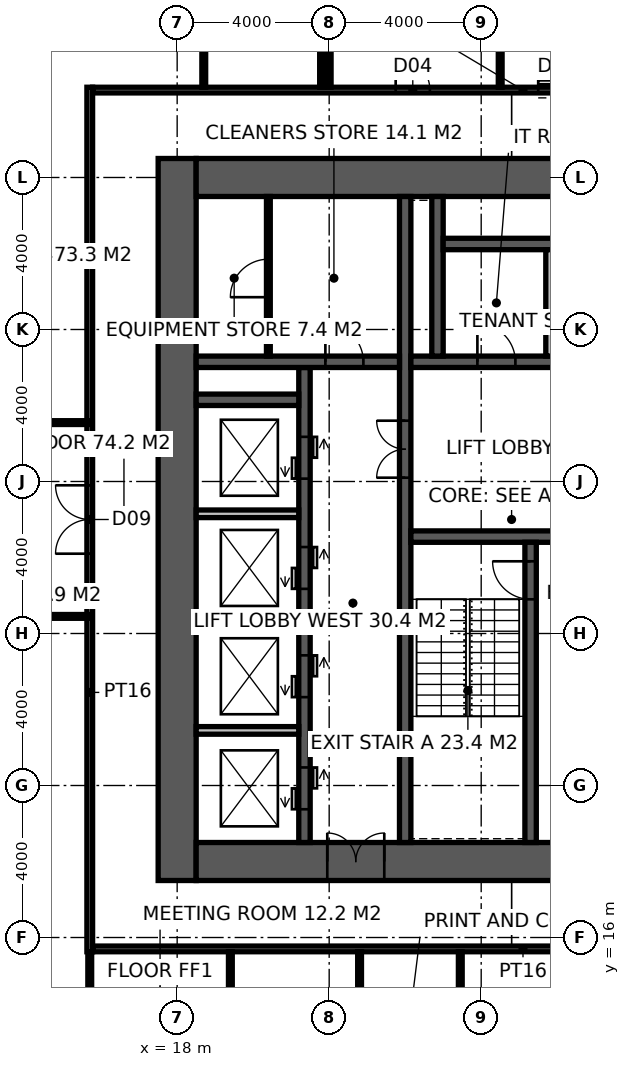
"""IFC4 building model, lengths in metres.
Left out: names, types, materials, properties, quantities, classifications, styles, units other than length and angle.
Written with IfcOpenShell. Run it as: python <this file> out.ifc"""

import sys

from ifc_helpers import new_model, si_unit, direction, frame, frame_2d, origin, place, context, subcontext, project, spatial, rectangle, extrude, element, fill, save


model = new_model("IFC4")
c1 = context("Model", 3, precision=1e-05, world=origin(), true_north=direction((0.0, 1.0)))
c2 = subcontext(c1, "Body", "Model", "MODEL_VIEW")
j1 = project(units=[si_unit("LENGTHUNIT", "METRE"), si_unit("PLANEANGLEUNIT", "RADIAN")], contexts=[c1])
p1 = place(None, origin())
s1 = spatial("IfcSite", under=j1, at=p1, CompositionType="ELEMENT")
p2 = place(p1, origin())
s2 = spatial("IfcBuilding", under=s1, at=p2, CompositionType="ELEMENT")
p3 = place(p2, frame((0.0, 0.0, 230.2)))
s3 = spatial("IfcBuildingStorey", under=s2, at=p3, CompositionType="ELEMENT", Elevation=230.2)
p4 = place(p3, frame((18.0, 17.5, -0.15), z_axis=(0.0, 0.0, 1.0), x_axis=(0.0, 1.0, 0.0)))
e1 = element("IfcWall", 1, at=p4, inside=s3, PredefinedType="SHEAR", context=c2, shape_type="SweptSolid", body=[
    extrude(rectangle(XDim=19.0, YDim=1.0, at=frame_2d((9.5, 0.0))), origin(), (0.0, 0.0, 1.0), 4.0),
])
p5 = place(p3, frame((18.5, 18.0, -0.15), z_axis=(0.0, 0.0, 1.0), x_axis=(1.0, 0.0, 0.0)))
e2 = element("IfcWall", 2, at=p5, inside=s3, PredefinedType="SHEAR", context=c2, shape_type="SweptSolid", body=[
    extrude(rectangle(XDim=17.6, YDim=1.0, at=frame_2d((8.8, 0.0))), origin(), (0.0, 0.0, 1.0), 4.0),
])
p6 = place(p5, frame((3.45, 0.0, 0.15)))
e3 = element("IfcOpeningElement", 3, at=p6, cuts=e2, PredefinedType="OPENING", context=c2, shape_type="SweptSolid", body=[
    extrude(rectangle(XDim=1.5, YDim=2.4, at=frame_2d((0.75, 1.2))), frame((0.0, 0.51, 0.0), z_axis=(0.0, -1.0, 0.0), x_axis=(1.0, 0.0, 0.0)), (0.0, 0.0, 1.0), 1.02),
])
p7 = place(p3, frame((18.5, 36.0, -0.15), z_axis=(0.0, 0.0, 1.0), x_axis=(1.0, 0.0, 0.0)))
e4 = element("IfcWall", 4, at=p7, inside=s3, PredefinedType="SHEAR", context=c2, shape_type="SweptSolid", body=[
    extrude(rectangle(XDim=17.6, YDim=1.0, at=frame_2d((8.8, 0.0))), origin(), (0.0, 0.0, 1.0), 4.0),
])
p8 = place(p3, frame((24.0, 18.5, -0.15), z_axis=(0.0, 0.0, 1.0), x_axis=(0.0, 1.0, 0.0)))
e5 = element("IfcWall", 5, at=p8, inside=s3, PredefinedType="SHEAR", context=c2, shape_type="SweptSolid", body=[
    extrude(rectangle(XDim=17.0, YDim=0.3, at=frame_2d((8.5, 0.0))), origin(), (0.0, 0.0, 1.0), 4.0),
])
p9 = place(p8, frame((9.6, 0.0, 0.15)))
e6 = element("IfcOpeningElement", 6, at=p9, cuts=e5, PredefinedType="OPENING", context=c2, shape_type="SweptSolid", body=[
    extrude(rectangle(XDim=1.5, YDim=2.4, at=frame_2d((0.75, 1.2))), frame((0.0, 0.16, 0.0), z_axis=(0.0, -1.0, 0.0), x_axis=(1.0, 0.0, 0.0)), (0.0, 0.0, 1.0), 0.32),
])
p10 = place(p3, frame((24.15, 26.55, -0.15), z_axis=(0.0, 0.0, 1.0), x_axis=(1.0, 0.0, 0.0)))
e7 = element("IfcWall", 7, at=p10, inside=s3, PredefinedType="SHEAR", context=c2, shape_type="SweptSolid", body=[
    extrude(rectangle(XDim=11.25, YDim=0.3, at=frame_2d((5.625, 0.0))), origin(), (0.0, 0.0, 1.0), 4.0),
])
p11 = place(p10, frame((9.25, 0.0, 0.15)))
e8 = element("IfcOpeningElement", 8, at=p11, cuts=e7, PredefinedType="OPENING", context=c2, shape_type="SweptSolid", body=[
    extrude(rectangle(XDim=1.0, YDim=2.2, at=frame_2d((0.5, 1.1))), frame((0.0, 0.16, 0.0), z_axis=(0.0, -1.0, 0.0), x_axis=(1.0, 0.0, 0.0)), (0.0, 0.0, 1.0), 0.32),
])
p12 = place(p10, frame((4.9, 0.0, 0.15)))
e9 = element("IfcOpeningElement", 9, at=p12, cuts=e7, PredefinedType="OPENING", context=c2, shape_type="SweptSolid", body=[
    extrude(rectangle(XDim=1.5, YDim=2.4, at=frame_2d((0.75, 1.2))), frame((0.0, 0.16, 0.0), z_axis=(0.0, -1.0, 0.0), x_axis=(1.0, 0.0, 0.0)), (0.0, 0.0, 1.0), 0.32),
])
p13 = place(p3, frame((27.3, 18.5, -0.15), z_axis=(0.0, 0.0, 1.0), x_axis=(0.0, 1.0, 0.0)))
e10 = element("IfcWall", 10, at=p13, inside=s3, PredefinedType="SHEAR", context=c2, shape_type="SweptSolid", body=[
    extrude(rectangle(XDim=7.9, YDim=0.3, at=frame_2d((3.95, 0.0))), origin(), (0.0, 0.0, 1.0), 4.0),
])
p14 = place(p13, frame((6.4, 0.0, 0.15)))
e11 = element("IfcOpeningElement", 11, at=p14, cuts=e10, PredefinedType="OPENING", context=c2, shape_type="SweptSolid", body=[
    extrude(rectangle(XDim=1.0, YDim=2.2, at=frame_2d((0.5, 1.1))), frame((0.0, 0.16, 0.0), z_axis=(0.0, -1.0, 0.0), x_axis=(1.0, 0.0, 0.0)), (0.0, 0.0, 1.0), 0.32),
])
p15 = place(p3, frame((24.15, 31.15, -0.15), z_axis=(0.0, 0.0, 1.0), x_axis=(1.0, 0.0, 0.0)))
e12 = element("IfcWall", 12, at=p15, inside=s3, PredefinedType="SHEAR", context=c2, shape_type="SweptSolid", body=[
    extrude(rectangle(XDim=11.25, YDim=0.3, at=frame_2d((5.625, 0.0))), origin(), (0.0, 0.0, 1.0), 4.0),
])
p16 = place(p15, frame((1.75, 0.0, 0.15)))
e13 = element("IfcOpeningElement", 13, at=p16, cuts=e12, PredefinedType="OPENING", context=c2, shape_type="SweptSolid", body=[
    extrude(rectangle(XDim=1.0, YDim=2.2, at=frame_2d((0.5, 1.1))), frame((0.0, 0.16, 0.0), z_axis=(0.0, -1.0, 0.0), x_axis=(1.0, 0.0, 0.0)), (0.0, 0.0, 1.0), 0.32),
])
p17 = place(p15, frame((4.55, 0.0, 0.15)))
e14 = element("IfcOpeningElement", 14, at=p17, cuts=e12, PredefinedType="OPENING", context=c2, shape_type="SweptSolid", body=[
    extrude(rectangle(XDim=1.0, YDim=2.2, at=frame_2d((0.5, 1.1))), frame((0.0, 0.16, 0.0), z_axis=(0.0, -1.0, 0.0), x_axis=(1.0, 0.0, 0.0)), (0.0, 0.0, 1.0), 0.32),
])
p18 = place(p15, frame((7.25, 0.0, 0.15)))
e15 = element("IfcOpeningElement", 15, at=p18, cuts=e12, PredefinedType="OPENING", context=c2, shape_type="SweptSolid", body=[
    extrude(rectangle(XDim=1.4, YDim=2.4, at=frame_2d((0.7, 1.2))), frame((0.0, 0.16, 0.0), z_axis=(0.0, -1.0, 0.0), x_axis=(1.0, 0.0, 0.0)), (0.0, 0.0, 1.0), 0.32),
])
p19 = place(p3, frame((21.35, 18.5, -0.15), z_axis=(0.0, 0.0, 1.0), x_axis=(0.0, 1.0, 0.0)))
e16 = element("IfcWall", 16, at=p19, inside=s3, PredefinedType="SHEAR", context=c2, shape_type="SweptSolid", body=[
    extrude(rectangle(XDim=12.5, YDim=0.3, at=frame_2d((6.25, 0.0))), origin(), (0.0, 0.0, 1.0), 4.0),
])
p20 = place(p19, frame((0.875, 0.0, 0.15)))
e17 = element("IfcOpeningElement", 17, at=p20, cuts=e16, PredefinedType="OPENING", context=c2, shape_type="SweptSolid", body=[
    extrude(rectangle(XDim=1.1, YDim=2.2, at=frame_2d((0.55, 1.1))), frame((0.0, 0.16, 0.0), z_axis=(0.0, -1.0, 0.0), x_axis=(1.0, 0.0, 0.0)), (0.0, 0.0, 1.0), 0.32),
])
p21 = place(p19, frame((3.825, 0.0, 0.15)))
e18 = element("IfcOpeningElement", 18, at=p21, cuts=e16, PredefinedType="OPENING", context=c2, shape_type="SweptSolid", body=[
    extrude(rectangle(XDim=1.1, YDim=2.2, at=frame_2d((0.55, 1.1))), frame((0.0, 0.16, 0.0), z_axis=(0.0, -1.0, 0.0), x_axis=(1.0, 0.0, 0.0)), (0.0, 0.0, 1.0), 0.32),
])
p22 = place(p19, frame((6.675, 0.0, 0.15)))
e19 = element("IfcOpeningElement", 19, at=p22, cuts=e16, PredefinedType="OPENING", context=c2, shape_type="SweptSolid", body=[
    extrude(rectangle(XDim=1.1, YDim=2.2, at=frame_2d((0.55, 1.1))), frame((0.0, 0.16, 0.0), z_axis=(0.0, -1.0, 0.0), x_axis=(1.0, 0.0, 0.0)), (0.0, 0.0, 1.0), 0.32),
])
p23 = place(p19, frame((9.575, 0.0, 0.15)))
e20 = element("IfcOpeningElement", 20, at=p23, cuts=e16, PredefinedType="OPENING", context=c2, shape_type="SweptSolid", body=[
    extrude(rectangle(XDim=1.1, YDim=2.2, at=frame_2d((0.55, 1.1))), frame((0.0, 0.16, 0.0), z_axis=(0.0, -1.0, 0.0), x_axis=(1.0, 0.0, 0.0)), (0.0, 0.0, 1.0), 0.32),
])
p24 = place(p3, frame((18.5, 31.15, -0.15), z_axis=(0.0, 0.0, 1.0), x_axis=(1.0, 0.0, 0.0)))
e21 = element("IfcWall", 21, at=p24, inside=s3, PredefinedType="SHEAR", context=c2, shape_type="SweptSolid", body=[
    extrude(rectangle(XDim=5.35, YDim=0.3, at=frame_2d((2.675, 0.0))), origin(), (0.0, 0.0, 1.0), 4.0),
])
p25 = place(p24, frame((3.4, 0.0, 0.15)))
e22 = element("IfcOpeningElement", 22, at=p25, cuts=e21, PredefinedType="OPENING", context=c2, shape_type="SweptSolid", body=[
    extrude(rectangle(XDim=1.0, YDim=2.2, at=frame_2d((0.5, 1.1))), frame((0.0, 0.16, 0.0), z_axis=(0.0, -1.0, 0.0), x_axis=(1.0, 0.0, 0.0)), (0.0, 0.0, 1.0), 0.32),
])
p26 = place(p3, frame((18.5, 30.15, -0.15), z_axis=(0.0, 0.0, 1.0), x_axis=(1.0, 0.0, 0.0)))
e23 = element("IfcWall", 23, at=p26, inside=s3, PredefinedType="SHEAR", context=c2, shape_type="SweptSolid", body=[
    extrude(rectangle(XDim=2.7, YDim=0.3, at=frame_2d((1.35, 0.0))), origin(), (0.0, 0.0, 1.0), 4.0),
])
p27 = place(p3, frame((24.85, 31.3, -0.15), z_axis=(0.0, 0.0, 1.0), x_axis=(0.0, 1.0, 0.0)))
e24 = element("IfcWall", 24, at=p27, inside=s3, PredefinedType="SHEAR", context=c2, shape_type="SweptSolid", body=[
    extrude(rectangle(XDim=4.2, YDim=0.3, at=frame_2d((2.1, 0.0))), origin(), (0.0, 0.0, 1.0), 4.0),
])
p28 = place(p3, frame((25.0, 34.25, -0.15), z_axis=(0.0, 0.0, 1.0), x_axis=(1.0, 0.0, 0.0)))
e25 = element("IfcWall", 25, at=p28, inside=s3, PredefinedType="SHEAR", context=c2, shape_type="SweptSolid", body=[
    extrude(rectangle(XDim=8.6, YDim=0.3, at=frame_2d((4.3, 0.0))), origin(), (0.0, 0.0, 1.0), 4.0),
])
p29 = place(p3, frame((27.8, 31.3, -0.15), z_axis=(0.0, 0.0, 1.0), x_axis=(0.0, 1.0, 0.0)))
e26 = element("IfcWall", 26, at=p29, inside=s3, PredefinedType="SOLIDWALL", context=c2, shape_type="SweptSolid", body=[
    extrude(rectangle(XDim=2.8, YDim=0.2, at=frame_2d((1.4, 0.0))), origin(), (0.0, 0.0, 1.0), 4.0),
])
for number, where, z_axis, x_axis in (
    (27, (18.5, 21.45, -0.15), (0.0, 0.0, 1.0), (1.0, 0.0, 0.0)),
    (28, (18.5, 24.3, -0.15), (0.0, 0.0, 1.0), (1.0, 0.0, 0.0)),
    (29, (18.5, 27.15, -0.15), (0.0, 0.0, 1.0), (1.0, 0.0, 0.0)),
):
    element("IfcWall", number, at=place(p3, frame(where, z_axis=z_axis, x_axis=x_axis)), inside=s3, PredefinedType="SOLIDWALL", context=c2, shape_type="SweptSolid", body=[
        extrude(rectangle(XDim=2.7, YDim=0.2, at=frame_2d((1.35, 0.0))), origin(), (0.0, 0.0, 1.0), 4.0),
    ])
p30 = place(p3, frame((20.4, 31.3, 0.0), z_axis=(0.0, 0.0, 1.0), x_axis=(0.0, 1.0, 0.0)))
e30 = element("IfcWall", 30, at=p30, inside=s3, PredefinedType="PARTITIONING", context=c2, shape_type="SweptSolid", body=[
    extrude(rectangle(XDim=4.2, YDim=0.1, at=frame_2d((2.1, 0.0))), origin(), (0.0, 0.0, 1.0), 3.85),
])
p31 = place(p30, frame((1.55, 0.0, 0.0)))
e31 = element("IfcOpeningElement", 31, at=p31, cuts=e30, PredefinedType="OPENING", context=c2, shape_type="SweptSolid", body=[
    extrude(rectangle(XDim=1.0, YDim=2.2, at=frame_2d((0.5, 1.1))), frame((0.0, 0.06, 0.0), z_axis=(0.0, -1.0, 0.0), x_axis=(1.0, 0.0, 0.0)), (0.0, 0.0, 1.0), 0.12),
])
p32 = place(p3, frame((15.7, 15.625, 0.0), z_axis=(0.0, 0.0, 1.0), x_axis=(0.0, 1.0, 0.0)))
e32 = element("IfcWall", 32, at=p32, inside=s3, PredefinedType="PARTITIONING", context=c2, shape_type="SweptSolid", body=[
    extrude(rectangle(XDim=22.75, YDim=0.15, at=frame_2d((11.375, 0.0))), origin(), (0.0, 0.0, 1.0), 3.85),
])
p33 = place(p32, frame((10.475, 0.0, 0.0)))
e33 = element("IfcOpeningElement", 33, at=p33, cuts=e32, PredefinedType="OPENING", context=c2, shape_type="SweptSolid", body=[
    extrude(rectangle(XDim=1.8, YDim=2.4, at=frame_2d((0.9, 1.2))), frame((0.0, 0.085, 0.0), z_axis=(0.0, -1.0, 0.0), x_axis=(1.0, 0.0, 0.0)), (0.0, 0.0, 1.0), 0.17),
])
p34 = place(p3, frame((15.775, 15.7, 0.0), z_axis=(0.0, 0.0, 1.0), x_axis=(1.0, 0.0, 0.0)))
e34 = element("IfcWall", 34, at=p34, inside=s3, PredefinedType="PARTITIONING", context=c2, shape_type="SweptSolid", body=[
    extrude(rectangle(XDim=22.65, YDim=0.15, at=frame_2d((11.325, 0.0))), origin(), (0.0, 0.0, 1.0), 3.85),
])
p35 = place(p3, frame((15.775, 38.3, 0.0), z_axis=(0.0, 0.0, 1.0), x_axis=(1.0, 0.0, 0.0)))
e35 = element("IfcWall", 35, at=p35, inside=s3, PredefinedType="PARTITIONING", context=c2, shape_type="SweptSolid", body=[
    extrude(rectangle(XDim=22.65, YDim=0.15, at=frame_2d((11.325, 0.0))), origin(), (0.0, 0.0, 1.0), 3.85),
])
p36 = place(p35, frame((7.975, 0.0, 0.0)))
e36 = element("IfcOpeningElement", 36, at=p36, cuts=e35, PredefinedType="OPENING", context=c2, shape_type="SweptSolid", body=[
    extrude(rectangle(XDim=0.9, YDim=2.1, at=frame_2d((0.45, 1.05))), frame((0.0, 0.085, 0.0), z_axis=(0.0, -1.0, 0.0), x_axis=(1.0, 0.0, 0.0)), (0.0, 0.0, 1.0), 0.17),
])
p37 = place(p35, frame((11.725, 0.0, 0.0)))
e37 = element("IfcOpeningElement", 37, at=p37, cuts=e35, PredefinedType="OPENING", context=c2, shape_type="SweptSolid", body=[
    extrude(rectangle(XDim=1.0, YDim=2.1, at=frame_2d((0.5, 1.05))), frame((0.0, 0.085, 0.0), z_axis=(0.0, -1.0, 0.0), x_axis=(1.0, 0.0, 0.0)), (0.0, 0.0, 1.0), 0.17),
])
p38 = place(p35, frame((15.575, 0.0, 0.0)))
e38 = element("IfcOpeningElement", 38, at=p38, cuts=e35, PredefinedType="OPENING", context=c2, shape_type="SweptSolid", body=[
    extrude(rectangle(XDim=0.9, YDim=2.1, at=frame_2d((0.45, 1.05))), frame((0.0, 0.085, 0.0), z_axis=(0.0, -1.0, 0.0), x_axis=(1.0, 0.0, 0.0)), (0.0, 0.0, 1.0), 0.17),
])
p39 = place(p3, frame((22.0, 38.375, 0.0), z_axis=(0.0, 0.0, 1.0), x_axis=(0.0, 1.0, 0.0)))
e39 = element("IfcWall", 39, at=p39, inside=s3, PredefinedType="PARTITIONING", context=c2, shape_type="SweptSolid", body=[
    extrude(rectangle(XDim=3.675, YDim=0.1, at=frame_2d((1.837, 0.0))), origin(), (0.0, 0.0, 1.0), 2.95),
])
p40 = place(p3, frame((26.5, 38.375, 0.0), z_axis=(0.0, 0.0, 1.0), x_axis=(0.0, 1.0, 0.0)))
e40 = element("IfcWall", 40, at=p40, inside=s3, PredefinedType="PARTITIONING", context=c2, shape_type="SweptSolid", body=[
    extrude(rectangle(XDim=3.575, YDim=0.1, at=frame_2d((1.788, 0.0))), origin(), (0.0, 0.0, 1.0), 3.85),
])
p41 = place(p3, frame((15.7, 12.15, 0.0), z_axis=(0.0, 0.0, 1.0), x_axis=(0.0, 1.0, 0.0)))
e41 = element("IfcWall", 41, at=p41, inside=s3, PredefinedType="PARTITIONING", context=c2, shape_type="SweptSolid", body=[
    extrude(rectangle(XDim=3.475, YDim=0.1, at=frame_2d((1.738, 0.0))), origin(), (0.0, 0.0, 1.0), 3.85),
])
p42 = place(p3, frame((18.7, 38.375, 0.0), z_axis=(0.0, 0.0, 1.0), x_axis=(0.0, 1.0, 0.0)))
e42 = element("IfcWall", 42, at=p42, inside=s3, PredefinedType="PARTITIONING", context=c2, shape_type="SweptSolid", body=[
    extrude(rectangle(XDim=4.075, YDim=0.1, at=frame_2d((2.038, 0.0))), origin(), (0.0, 0.0, 1.0), 3.85),
])
p43 = place(p3, frame((19.4, 12.15, 0.0), z_axis=(0.0, 0.0, 1.0), x_axis=(0.0, 1.0, 0.0)))
e43 = element("IfcWall", 43, at=p43, inside=s3, PredefinedType="PARTITIONING", context=c2, shape_type="SweptSolid", body=[
    extrude(rectangle(XDim=3.475, YDim=0.1, at=frame_2d((1.738, 0.0))), origin(), (0.0, 0.0, 1.0), 3.85),
])
p44 = place(p3, frame((21.8, 38.375, 0.0), z_axis=(0.0, 0.0, 1.0), x_axis=(0.0, 1.0, 0.0)))
e44 = element("IfcWall", 44, at=p44, inside=s3, PredefinedType="PARTITIONING", context=c2, shape_type="SweptSolid", body=[
    extrude(rectangle(XDim=4.075, YDim=0.1, at=frame_2d((2.038, 0.0))), origin(), (0.0, 0.0, 1.0), 2.95),
])
for number, where, z_axis, x_axis in (
    (45, (22.8, 12.15, 0.0), (0.0, 0.0, 1.0), (0.0, 1.0, 0.0)),
    (46, (25.45, 12.15, 0.0), (0.0, 0.0, 1.0), (0.0, 1.0, 0.0)),
):
    element("IfcWall", number, at=place(p3, frame(where, z_axis=z_axis, x_axis=x_axis)), inside=s3, PredefinedType="PARTITIONING", context=c2, shape_type="SweptSolid", body=[
        extrude(rectangle(XDim=3.475, YDim=0.1, at=frame_2d((1.738, 0.0))), origin(), (0.0, 0.0, 1.0), 3.85),
    ])
p45 = place(p3, frame((15.7, 29.55, 0.0), z_axis=(0.0, 0.0, 1.0), x_axis=(-1.0, 0.0, 0.0)))
e47 = element("IfcWall", 47, at=p45, inside=s3, PredefinedType="PARTITIONING", context=c2, shape_type="SweptSolid", body=[
    extrude(rectangle(XDim=4.5, YDim=0.1, at=frame_2d((2.25, 0.0))), origin(), (0.0, 0.0, 1.0), 3.85),
])
p46 = place(p3, frame((11.2, 24.45, 0.0), z_axis=(0.0, 0.0, 1.0), x_axis=(1.0, 0.0, 0.0)))
e48 = element("IfcWall", 48, at=p46, inside=s3, PredefinedType="PARTITIONING", context=c2, shape_type="SweptSolid", body=[
    extrude(rectangle(XDim=4.5, YDim=0.1, at=frame_2d((2.25, 0.0))), origin(), (0.0, 0.0, 1.0), 2.95),
])
p47 = place(p14, origin())
e49 = element("IfcDoor", 49, at=p47, inside=s3, OperationType="SINGLE_SWING_RIGHT", PredefinedType="DOOR", context=c2, shape_type="SweptSolid", body=[
    extrude(rectangle(XDim=1.0, YDim=2.2, at=frame_2d((0.5, 1.1))), frame((0.0, 0.025, 0.0), z_axis=(0.0, -1.0, 0.0), x_axis=(1.0, 0.0, 0.0)), (0.0, 0.0, 1.0), 0.05),
])
fill(e11, e49)
p48 = place(p9, origin())
e50 = element("IfcDoor", 50, at=p48, inside=s3, OperationType="DOUBLE_DOOR_DOUBLE_SWING", PredefinedType="DOOR", context=c2, shape_type="SweptSolid", body=[
    extrude(rectangle(XDim=1.5, YDim=2.4, at=frame_2d((0.75, 1.2))), frame((0.0, 0.025, 0.0), z_axis=(0.0, -1.0, 0.0), x_axis=(1.0, 0.0, 0.0)), (0.0, 0.0, 1.0), 0.05),
])
fill(e6, e50)
p49 = place(p25, origin())
e51 = element("IfcDoor", 51, at=p49, inside=s3, OperationType="SINGLE_SWING_LEFT", PredefinedType="DOOR", context=c2, shape_type="SweptSolid", body=[
    extrude(rectangle(XDim=1.0, YDim=2.2, at=frame_2d((0.5, 1.1))), frame((0.0, 0.025, 0.0), z_axis=(0.0, -1.0, 0.0), x_axis=(1.0, 0.0, 0.0)), (0.0, 0.0, 1.0), 0.05),
])
fill(e22, e51)
p50 = place(p31, origin())
e52 = element("IfcDoor", 52, at=p50, inside=s3, OperationType="SINGLE_SWING_LEFT", PredefinedType="DOOR", context=c2, shape_type="SweptSolid", body=[
    extrude(rectangle(XDim=1.0, YDim=2.2, at=frame_2d((0.5, 1.1))), frame((0.0, 0.025, 0.0), z_axis=(0.0, -1.0, 0.0), x_axis=(1.0, 0.0, 0.0)), (0.0, 0.0, 1.0), 0.05),
])
fill(e31, e52)
p51 = place(p16, origin())
e53 = element("IfcDoor", 53, at=p51, inside=s3, OperationType="SINGLE_SWING_LEFT", PredefinedType="DOOR", context=c2, shape_type="SweptSolid", body=[
    extrude(rectangle(XDim=1.0, YDim=2.2, at=frame_2d((0.5, 1.1))), frame((0.0, 0.025, 0.0), z_axis=(0.0, -1.0, 0.0), x_axis=(1.0, 0.0, 0.0)), (0.0, 0.0, 1.0), 0.05),
])
fill(e13, e53)
p52 = place(p6, origin())
e54 = element("IfcDoor", 54, at=p52, inside=s3, OperationType="DOUBLE_DOOR_DOUBLE_SWING", PredefinedType="DOOR", context=c2, shape_type="SweptSolid", body=[
    extrude(rectangle(XDim=1.5, YDim=2.4, at=frame_2d((0.75, 1.2))), frame((0.0, 0.025, 0.0), z_axis=(0.0, -1.0, 0.0), x_axis=(1.0, 0.0, 0.0)), (0.0, 0.0, 1.0), 0.05),
])
fill(e3, e54)
p53 = place(p36, origin())
e55 = element("IfcDoor", 55, at=p53, inside=s3, OperationType="SINGLE_SWING_LEFT", PredefinedType="DOOR", context=c2, shape_type="SweptSolid", body=[
    extrude(rectangle(XDim=0.9, YDim=2.1, at=frame_2d((0.45, 1.05))), frame((0.0, 0.025, 0.0), z_axis=(0.0, -1.0, 0.0), x_axis=(1.0, 0.0, 0.0)), (0.0, 0.0, 1.0), 0.05),
])
fill(e36, e55)
p54 = place(p37, origin())
e56 = element("IfcDoor", 56, at=p54, inside=s3, OperationType="SLIDING_TO_LEFT", PredefinedType="DOOR", context=c2, shape_type="SweptSolid", body=[
    extrude(rectangle(XDim=1.0, YDim=2.1, at=frame_2d((0.5, 1.05))), frame((0.0, 0.025, 0.0), z_axis=(0.0, -1.0, 0.0), x_axis=(1.0, 0.0, 0.0)), (0.0, 0.0, 1.0), 0.05),
])
fill(e37, e56)
p55 = place(p33, origin())
e57 = element("IfcDoor", 57, at=p55, inside=s3, OperationType="DOUBLE_DOOR_DOUBLE_SWING", PredefinedType="DOOR", context=c2, shape_type="SweptSolid", body=[
    extrude(rectangle(XDim=1.8, YDim=2.4, at=frame_2d((0.9, 1.2))), frame((0.0, 0.025, 0.0), z_axis=(0.0, -1.0, 0.0), x_axis=(1.0, 0.0, 0.0)), (0.0, 0.0, 1.0), 0.05),
])
fill(e33, e57)
p56 = place(p20, origin())
e58 = element("IfcDoor", 58, at=p56, inside=s3, OperationType="DOUBLE_DOOR_SLIDING", PredefinedType="DOOR", context=c2, shape_type="SweptSolid", body=[
    extrude(rectangle(XDim=1.1, YDim=2.2, at=frame_2d((0.55, 1.1))), frame((0.0, 0.025, 0.0), z_axis=(0.0, -1.0, 0.0), x_axis=(1.0, 0.0, 0.0)), (0.0, 0.0, 1.0), 0.05),
])
fill(e17, e58)
p57 = place(p21, origin())
e59 = element("IfcDoor", 59, at=p57, inside=s3, OperationType="DOUBLE_DOOR_SLIDING", PredefinedType="DOOR", context=c2, shape_type="SweptSolid", body=[
    extrude(rectangle(XDim=1.1, YDim=2.2, at=frame_2d((0.55, 1.1))), frame((0.0, 0.025, 0.0), z_axis=(0.0, -1.0, 0.0), x_axis=(1.0, 0.0, 0.0)), (0.0, 0.0, 1.0), 0.05),
])
fill(e18, e59)
p58 = place(p22, origin())
e60 = element("IfcDoor", 60, at=p58, inside=s3, OperationType="DOUBLE_DOOR_SLIDING", PredefinedType="DOOR", context=c2, shape_type="SweptSolid", body=[
    extrude(rectangle(XDim=1.1, YDim=2.2, at=frame_2d((0.55, 1.1))), frame((0.0, 0.025, 0.0), z_axis=(0.0, -1.0, 0.0), x_axis=(1.0, 0.0, 0.0)), (0.0, 0.0, 1.0), 0.05),
])
fill(e19, e60)
p59 = place(p23, origin())
e61 = element("IfcDoor", 61, at=p59, inside=s3, OperationType="DOUBLE_DOOR_SLIDING", PredefinedType="DOOR", context=c2, shape_type="SweptSolid", body=[
    extrude(rectangle(XDim=1.1, YDim=2.2, at=frame_2d((0.55, 1.1))), frame((0.0, 0.025, 0.0), z_axis=(0.0, -1.0, 0.0), x_axis=(1.0, 0.0, 0.0)), (0.0, 0.0, 1.0), 0.05),
])
fill(e20, e61)
save(model, sys.argv[1])
